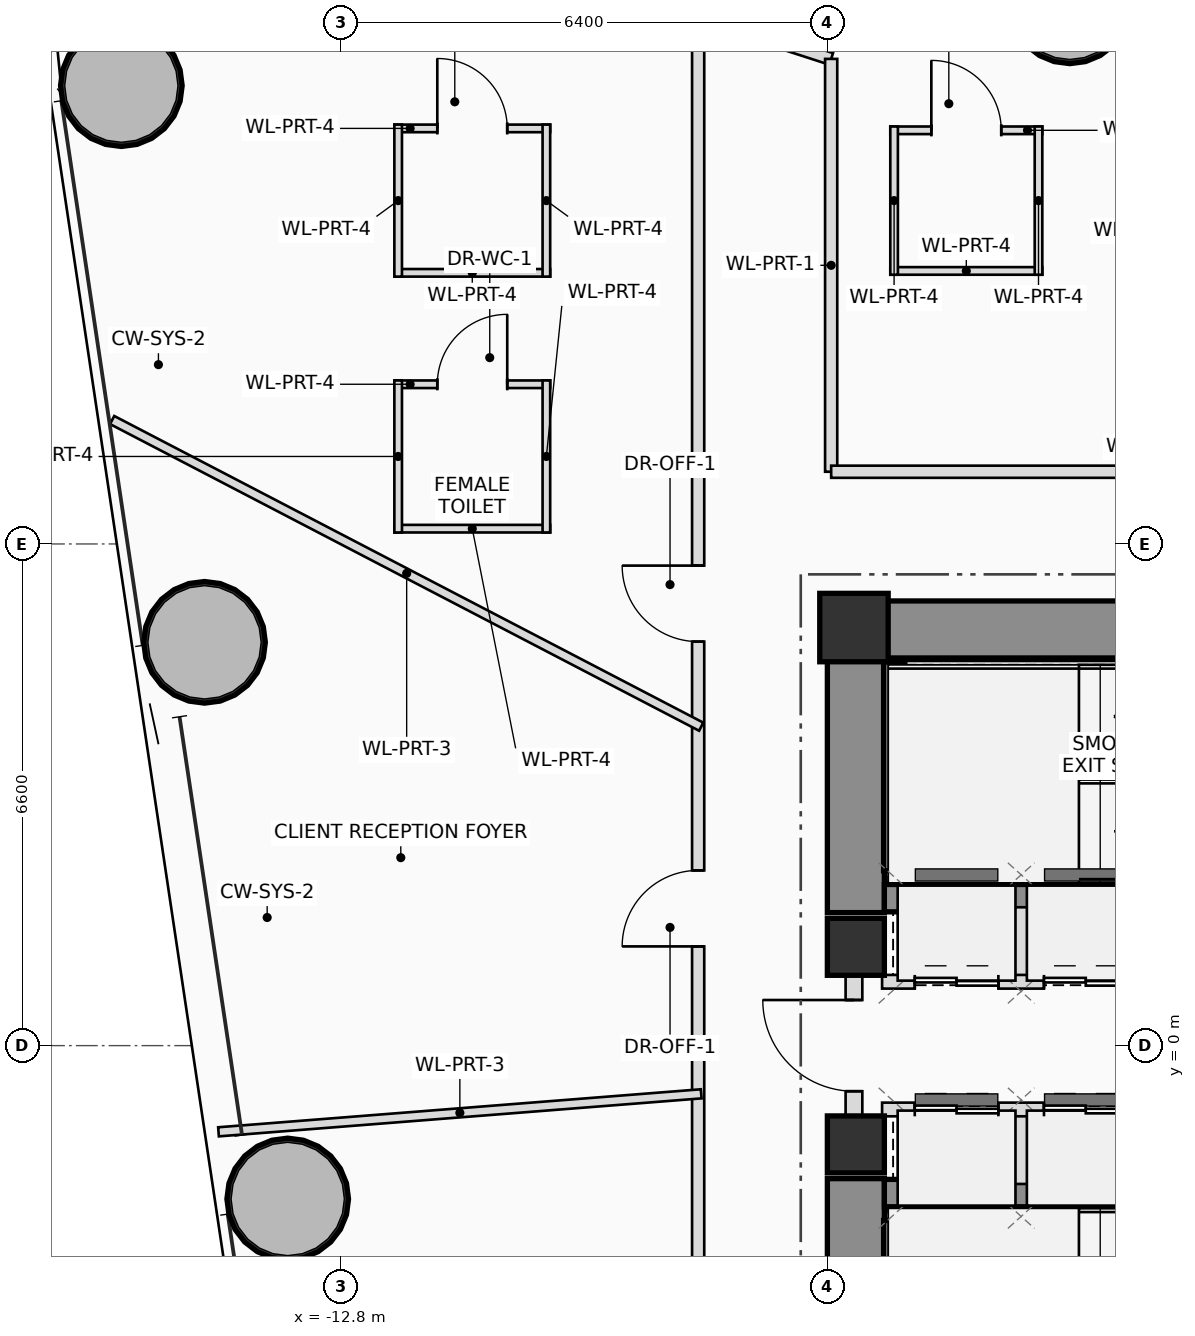
"""IFC4 building model, lengths in metres.
Left out: names, types, materials, properties, quantities, classifications, styles, units other than length and angle.
Written with IfcOpenShell. Run it as: python <this file> out.ifc"""

import sys

from ifc_helpers import new_model, si_unit, direction, frame, frame_2d, origin, origin_2d, place, context, subcontext, project, spatial, rectangle, hollow_circle, extrude, source, transform, mapped, element, fill, save


model = new_model("IFC4")
c1 = context("Model", 3, precision=1e-05, world=origin(), true_north=direction((0.0, 1.0)))
c2 = subcontext(c1, "Body", "Model", "MODEL_VIEW")
j1 = project(units=[si_unit("LENGTHUNIT", "METRE"), si_unit("PLANEANGLEUNIT", "RADIAN")], contexts=[c1])
p1 = place(None, origin())
s1 = spatial("IfcSite", under=j1, at=p1, CompositionType="ELEMENT")
p2 = place(p1, origin())
s2 = spatial("IfcBuilding", under=s1, at=p2, CompositionType="ELEMENT")
p3 = place(p2, frame((0.0, 0.0, 73.55)))
s3 = spatial("IfcBuildingStorey", under=s2, at=p3, CompositionType="ELEMENT", Elevation=73.55)
m1 = source(origin(), c2, "Body", "SweptSolid", [
    extrude(rectangle(XDim=0.9, YDim=0.9, at=origin_2d()), origin(), (0.0, 0.0, 1.0), 3.75),
])
p4 = place(p3, frame((-6.05, 5.5, 0.0), z_axis=(0.0, 0.0, 1.0), x_axis=(1.0, 0.0, 0.0)))
e1 = element("IfcColumn", 1, at=p4, inside=s3, PredefinedType="COLUMN", context=c2, shape_type="MappedRepresentation", body=[
    mapped(m1, transform((0.0, 0.0, 0.0), scale=1.0)),
])
p5 = place(p3, frame((-6.4, 5.475, 0.0), z_axis=(0.0, 0.0, 1.0), x_axis=(1.0, 0.0, 0.0)))
e2 = element("IfcWall", 2, at=p5, inside=s3, PredefinedType="SHEAR", context=c2, shape_type="SweptSolid", body=[
    extrude(rectangle(XDim=12.8, YDim=0.75, at=frame_2d((6.4, 0.0))), origin(), (0.0, 0.0, 1.0), 3.75),
])
p6 = place(p5, frame((8.6, 0.0, 0.0)))
e3 = element("IfcOpeningElement", 3, at=p6, cuts=e2, PredefinedType="OPENING", context=c2, shape_type="SweptSolid", body=[
    extrude(rectangle(XDim=1.2, YDim=2.2, at=frame_2d((0.6, 1.1))), frame((0.0, 0.385, 0.0), z_axis=(0.0, -1.0, 0.0), x_axis=(1.0, 0.0, 0.0)), (0.0, 0.0, 1.0), 0.77),
])
for number, where, z_axis, x_axis in (
    (4, (-6.025, -5.1, 0.0), (0.0, 0.0, 1.0), (0.0, 1.0, 0.0)),
    (5, (-6.025, 1.75, 0.0), (0.0, 0.0, 1.0), (0.0, 1.0, 0.0)),
):
    element("IfcWall", number, at=place(p3, frame(where, z_axis=z_axis, x_axis=x_axis)), inside=s3, PredefinedType="SHEAR", context=c2, shape_type="SweptSolid", body=[
        extrude(rectangle(XDim=3.35, YDim=0.75, at=frame_2d((1.675, 0.0))), origin(), (0.0, 0.0, 1.0), 3.75),
    ])
for number, where, z_axis, x_axis in (
    (6, (-5.65, 1.94, 0.0), (0.0, 0.0, 1.0), (1.0, 0.0, 0.0)),
    (7, (-5.65, -1.94, 0.0), (0.0, 0.0, 1.0), (1.0, 0.0, 0.0)),
):
    element("IfcWall", number, at=place(p3, frame(where, z_axis=z_axis, x_axis=x_axis)), inside=s3, PredefinedType="SHEAR", context=c2, shape_type="SweptSolid", body=[
        extrude(rectangle(XDim=11.3, YDim=0.36, at=frame_2d((5.65, 0.0))), origin(), (0.0, 0.0, 1.0), 3.75),
    ])
for number, where, z_axis, x_axis in (
    (8, (-5.52, 2.3, 0.0), (0.0, 0.0, 1.0), (0.0, 1.0, 0.0)),
    (9, (-5.52, -5.05, 0.0), (0.0, 0.0, 1.0), (0.0, 1.0, 0.0)),
):
    element("IfcWall", number, at=place(p3, frame(where, z_axis=z_axis, x_axis=x_axis)), inside=s3, PredefinedType="SHEAR", context=c2, shape_type="SweptSolid", body=[
        extrude(rectangle(XDim=2.75, YDim=0.28, at=frame_2d((1.375, 0.0))), origin(), (0.0, 0.0, 1.0), 3.75),
    ])
m2 = source(origin(), c2, "Body", "SweptSolid", [
    extrude(rectangle(XDim=0.75, YDim=0.75, at=origin_2d()), origin(), (0.0, 0.0, 1.0), 3.75),
])
for number, where, z_axis, x_axis in (
    (10, (-6.025, -1.3, 0.0), (0.0, 0.0, 1.0), (1.0, 0.0, 0.0)),
    (11, (-6.025, 1.3, 0.0), (0.0, 0.0, 1.0), (1.0, 0.0, 0.0)),
):
    element("IfcColumn", number, at=place(p3, frame(where, z_axis=z_axis, x_axis=x_axis)), inside=s3, PredefinedType="COLUMN", context=c2, shape_type="MappedRepresentation", body=[
        mapped(m2, transform((0.0, 0.0, 0.0), scale=1.0)),
    ])
m3 = source(origin(), c2, "Body", "SweptSolid", [
    extrude(hollow_circle(Radius=0.8, WallThickness=0.055, at=origin_2d()), origin(), (0.0, 0.0, 1.0), 3.75),
])
for number, where, z_axis, x_axis in (
    (12, (-3.21, 13.719, 0.0), (0.0, 0.0, 1.0), (1.0, 0.0, 0.0)),
    (13, (-15.689, 12.629, 0.0), (0.0, 0.0, 1.0), (1.0, 0.0, 0.0)),
    (14, (-14.594, 5.306, 0.0), (0.0, 0.0, 1.0), (1.0, 0.0, 0.0)),
    (15, (-13.5, -2.018, 0.0), (0.0, 0.0, 1.0), (1.0, 0.0, 0.0)),
):
    element("IfcColumn", number, at=place(p3, frame(where, z_axis=z_axis, x_axis=x_axis)), inside=s3, PredefinedType="COLUMN", context=c2, shape_type="MappedRepresentation", body=[
        mapped(m3, transform((0.0, 0.0, 0.0), scale=1.0)),
    ])
p7 = place(p3, frame((-6.05, -0.95, 0.0), z_axis=(0.0, 0.0, 1.0), x_axis=(0.0, 1.0, 0.0)))
e16 = element("IfcWall", 16, at=p7, inside=s3, PredefinedType="PLUMBINGWALL", context=c2, shape_type="SweptSolid", body=[
    extrude(rectangle(XDim=1.9, YDim=0.22, at=frame_2d((0.95, 0.0))), origin(), (0.0, 0.0, 1.0), 2.525),
])
p8 = place(p7, frame((0.35, 0.0, 0.0)))
e17 = element("IfcOpeningElement", 17, at=p8, cuts=e16, PredefinedType="OPENING", context=c2, shape_type="SweptSolid", body=[
    extrude(rectangle(XDim=1.2, YDim=2.2, at=frame_2d((0.6, 1.1))), frame((0.0, 0.12, 0.0), z_axis=(0.0, -1.0, 0.0), x_axis=(1.0, 0.0, 0.0)), (0.0, 0.0, 1.0), 0.24),
])
for number, where, z_axis, x_axis in (
    (18, (-3.85, 0.84, 0.0), (0.0, 0.0, 1.0), (0.0, 1.0, 0.0)),
    (19, (-3.85, -1.82, 0.0), (0.0, 0.0, 1.0), (0.0, 1.0, 0.0)),
):
    element("IfcWall", number, at=place(p3, frame(where, z_axis=z_axis, x_axis=x_axis)), inside=s3, PredefinedType="PLUMBINGWALL", context=c2, shape_type="SweptSolid", body=[
        extrude(rectangle(XDim=0.98, YDim=0.18, at=frame_2d((0.49, 0.0))), origin(), (0.0, 0.0, 1.0), 3.545),
    ])
p9 = place(p3, frame((-5.68, 0.84, 0.0), z_axis=(0.0, 0.0, 1.0), x_axis=(1.0, 0.0, 0.0)))
e20 = element("IfcWall", 20, at=p9, inside=s3, PredefinedType="PLUMBINGWALL", context=c2, shape_type="SweptSolid", body=[
    extrude(rectangle(XDim=11.33, YDim=0.18, at=frame_2d((5.665, 0.0))), origin(), (0.0, 0.0, 1.0), 3.545),
])
p10 = place(p9, frame((0.43, 0.0, 0.0)))
e21 = element("IfcOpeningElement", 21, at=p10, cuts=e20, PredefinedType="OPENING", context=c2, shape_type="SweptSolid", body=[
    extrude(rectangle(XDim=1.1, YDim=2.2, at=frame_2d((0.55, 1.1))), frame((0.0, 0.1, 0.0), z_axis=(0.0, -1.0, 0.0), x_axis=(1.0, 0.0, 0.0)), (0.0, 0.0, 1.0), 0.2),
])
p11 = place(p9, frame((2.13, 0.0, 0.0)))
e22 = element("IfcOpeningElement", 22, at=p11, cuts=e20, PredefinedType="OPENING", context=c2, shape_type="SweptSolid", body=[
    extrude(rectangle(XDim=1.1, YDim=2.2, at=frame_2d((0.55, 1.1))), frame((0.0, 0.1, 0.0), z_axis=(0.0, -1.0, 0.0), x_axis=(1.0, 0.0, 0.0)), (0.0, 0.0, 1.0), 0.2),
])
p12 = place(p3, frame((-5.68, -0.84, 0.0), z_axis=(0.0, 0.0, 1.0), x_axis=(1.0, 0.0, 0.0)))
e23 = element("IfcWall", 23, at=p12, inside=s3, PredefinedType="PLUMBINGWALL", context=c2, shape_type="SweptSolid", body=[
    extrude(rectangle(XDim=10.22, YDim=0.18, at=frame_2d((5.11, 0.0))), origin(), (0.0, 0.0, 1.0), 3.545),
])
p13 = place(p12, frame((0.43, 0.0, 0.0)))
e24 = element("IfcOpeningElement", 24, at=p13, cuts=e23, PredefinedType="OPENING", context=c2, shape_type="SweptSolid", body=[
    extrude(rectangle(XDim=1.1, YDim=2.2, at=frame_2d((0.55, 1.1))), frame((0.0, 0.1, 0.0), z_axis=(0.0, -1.0, 0.0), x_axis=(1.0, 0.0, 0.0)), (0.0, 0.0, 1.0), 0.2),
])
p14 = place(p12, frame((2.13, 0.0, 0.0)))
e25 = element("IfcOpeningElement", 25, at=p14, cuts=e23, PredefinedType="OPENING", context=c2, shape_type="SweptSolid", body=[
    extrude(rectangle(XDim=1.1, YDim=2.2, at=frame_2d((0.55, 1.1))), frame((0.0, 0.1, 0.0), z_axis=(0.0, -1.0, 0.0), x_axis=(1.0, 0.0, 0.0)), (0.0, 0.0, 1.0), 0.2),
])
p15 = place(p12, frame((9.02, 0.0, 0.0)))
e26 = element("IfcOpeningElement", 26, at=p15, cuts=e23, PredefinedType="OPENING", context=c2, shape_type="SweptSolid", body=[
    extrude(rectangle(XDim=0.9, YDim=2.05, at=frame_2d((0.45, 1.025))), frame((0.0, 0.1, 0.0), z_axis=(0.0, -1.0, 0.0), x_axis=(1.0, 0.0, 0.0)), (0.0, 0.0, 1.0), 0.2),
])
p16 = place(p3, frame((-12.097, 12.067, 0.0), z_axis=(0.0, 0.0, 1.0), x_axis=(1.0, 0.0, 0.0)))
e27 = element("IfcWall", 27, at=p16, inside=s3, PredefinedType="PARTITIONING", context=c2, shape_type="SweptSolid", body=[
    extrude(rectangle(XDim=2.05, YDim=0.1, at=frame_2d((1.025, 0.0))), origin(), (0.0, 0.0, 1.0), 3.2),
])
p17 = place(p16, frame((0.565, 0.0, 0.0)))
e28 = element("IfcOpeningElement", 28, at=p17, cuts=e27, PredefinedType="OPENING", context=c2, shape_type="SweptSolid", body=[
    extrude(rectangle(XDim=0.92, YDim=2.1, at=frame_2d((0.46, 1.05))), frame((0.0, 0.06, 0.0), z_axis=(0.0, -1.0, 0.0), x_axis=(1.0, 0.0, 0.0)), (0.0, 0.0, 1.0), 0.12),
])
p18 = place(p3, frame((-10.047, 10.167, 0.0), z_axis=(0.0, 0.0, 1.0), x_axis=(-1.0, 0.0, 0.0)))
e29 = element("IfcWall", 29, at=p18, inside=s3, PredefinedType="PARTITIONING", context=c2, shape_type="SweptSolid", body=[
    extrude(rectangle(XDim=2.05, YDim=0.1, at=frame_2d((1.025, 0.0))), origin(), (0.0, 0.0, 1.0), 3.545),
])
p19 = place(p3, frame((-10.097, 12.117, 0.0), z_axis=(0.0, 0.0, 1.0), x_axis=(0.0, -1.0, 0.0)))
e30 = element("IfcWall", 30, at=p19, inside=s3, PredefinedType="PARTITIONING", context=c2, shape_type="SweptSolid", body=[
    extrude(rectangle(XDim=2.0, YDim=0.1, at=frame_2d((1.0, 0.0))), origin(), (0.0, 0.0, 1.0), 3.545),
])
p20 = place(p3, frame((-12.047, 10.117, 0.0), z_axis=(0.0, 0.0, 1.0), x_axis=(0.0, 1.0, 0.0)))
e31 = element("IfcWall", 31, at=p20, inside=s3, PredefinedType="PARTITIONING", context=c2, shape_type="SweptSolid", body=[
    extrude(rectangle(XDim=2.0, YDim=0.1, at=frame_2d((1.0, 0.0))), origin(), (0.0, 0.0, 1.0), 3.2),
])
p21 = place(p3, frame((-12.097, 8.701, 0.0), z_axis=(0.0, 0.0, 1.0), x_axis=(1.0, 0.0, 0.0)))
e32 = element("IfcWall", 32, at=p21, inside=s3, PredefinedType="PARTITIONING", context=c2, shape_type="SweptSolid", body=[
    extrude(rectangle(XDim=2.05, YDim=0.1, at=frame_2d((1.025, 0.0))), origin(), (0.0, 0.0, 1.0), 2.85),
])
p22 = place(p21, frame((0.565, 0.0, 0.0)))
e33 = element("IfcOpeningElement", 33, at=p22, cuts=e32, PredefinedType="OPENING", context=c2, shape_type="SweptSolid", body=[
    extrude(rectangle(XDim=0.92, YDim=2.1, at=frame_2d((0.46, 1.05))), frame((0.0, 0.06, 0.0), z_axis=(0.0, -1.0, 0.0), x_axis=(1.0, 0.0, 0.0)), (0.0, 0.0, 1.0), 0.12),
])
p23 = place(p3, frame((-10.047, 6.801, 0.0), z_axis=(0.0, 0.0, 1.0), x_axis=(-1.0, 0.0, 0.0)))
e34 = element("IfcWall", 34, at=p23, inside=s3, PredefinedType="PARTITIONING", context=c2, shape_type="SweptSolid", body=[
    extrude(rectangle(XDim=2.05, YDim=0.1, at=frame_2d((1.025, 0.0))), origin(), (0.0, 0.0, 1.0), 3.05),
])
p24 = place(p3, frame((-10.097, 8.751, 0.0), z_axis=(0.0, 0.0, 1.0), x_axis=(0.0, -1.0, 0.0)))
e35 = element("IfcWall", 35, at=p24, inside=s3, PredefinedType="PARTITIONING", context=c2, shape_type="SweptSolid", body=[
    extrude(rectangle(XDim=2.0, YDim=0.1, at=frame_2d((1.0, 0.0))), origin(), (0.0, 0.0, 1.0), 2.85),
])
p25 = place(p3, frame((-12.047, 6.751, 0.0), z_axis=(0.0, 0.0, 1.0), x_axis=(0.0, 1.0, 0.0)))
e36 = element("IfcWall", 36, at=p25, inside=s3, PredefinedType="PARTITIONING", context=c2, shape_type="SweptSolid", body=[
    extrude(rectangle(XDim=2.0, YDim=0.1, at=frame_2d((1.0, 0.0))), origin(), (0.0, 0.0, 1.0), 3.545),
])
p26 = place(p3, frame((-5.572, 12.042, 0.0), z_axis=(0.0, 0.0, 1.0), x_axis=(1.0, 0.0, 0.0)))
e37 = element("IfcWall", 37, at=p26, inside=s3, PredefinedType="PARTITIONING", context=c2, shape_type="SweptSolid", body=[
    extrude(rectangle(XDim=2.0, YDim=0.1, at=frame_2d((1.0, 0.0))), origin(), (0.0, 0.0, 1.0), 2.85),
])
p27 = place(p26, frame((0.54, 0.0, 0.0)))
e38 = element("IfcOpeningElement", 38, at=p27, cuts=e37, PredefinedType="OPENING", context=c2, shape_type="SweptSolid", body=[
    extrude(rectangle(XDim=0.92, YDim=2.1, at=frame_2d((0.46, 1.05))), frame((0.0, 0.06, 0.0), z_axis=(0.0, -1.0, 0.0), x_axis=(1.0, 0.0, 0.0)), (0.0, 0.0, 1.0), 0.12),
])
p28 = place(p3, frame((-3.572, 10.192, 0.0), z_axis=(0.0, 0.0, 1.0), x_axis=(-1.0, 0.0, 0.0)))
e39 = element("IfcWall", 39, at=p28, inside=s3, PredefinedType="PARTITIONING", context=c2, shape_type="SweptSolid", body=[
    extrude(rectangle(XDim=2.0, YDim=0.1, at=frame_2d((1.0, 0.0))), origin(), (0.0, 0.0, 1.0), 2.85),
])
p29 = place(p3, frame((-3.622, 12.092, 0.0), z_axis=(0.0, 0.0, 1.0), x_axis=(0.0, -1.0, 0.0)))
e40 = element("IfcWall", 40, at=p29, inside=s3, PredefinedType="PARTITIONING", context=c2, shape_type="SweptSolid", body=[
    extrude(rectangle(XDim=1.95, YDim=0.1, at=frame_2d((0.975, 0.0))), origin(), (0.0, 0.0, 1.0), 2.85),
])
p30 = place(p3, frame((-5.522, 10.142, 0.0), z_axis=(0.0, 0.0, 1.0), x_axis=(0.0, 1.0, 0.0)))
e41 = element("IfcWall", 41, at=p30, inside=s3, PredefinedType="PARTITIONING", context=c2, shape_type="SweptSolid", body=[
    extrude(rectangle(XDim=1.95, YDim=0.1, at=frame_2d((0.975, 0.0))), origin(), (0.0, 0.0, 1.0), 3.2),
])
p31 = place(p3, frame((-8.1, -7.55, 0.0), z_axis=(0.0, 0.0, 1.0), x_axis=(0.0, 1.0, 0.0)))
e42 = element("IfcWall", 42, at=p31, inside=s3, PredefinedType="PARTITIONING", context=c2, shape_type="SweptSolid", body=[
    extrude(rectangle(XDim=15.1, YDim=0.16, at=frame_2d((7.55, 0.0))), origin(), (0.0, 0.0, 1.0), 2.85),
])
p32 = place(p31, frame((8.855, 0.0, 0.0)))
e43 = element("IfcOpeningElement", 43, at=p32, cuts=e42, PredefinedType="OPENING", context=c2, shape_type="SweptSolid", body=[
    extrude(rectangle(XDim=1.0, YDim=2.25, at=frame_2d((0.5, 1.125))), frame((0.0, 0.09, 0.0), z_axis=(0.0, -1.0, 0.0), x_axis=(1.0, 0.0, 0.0)), (0.0, 0.0, 1.0), 0.18),
])
p33 = place(p31, frame((12.865, 0.0, 0.0)))
e44 = element("IfcOpeningElement", 44, at=p33, cuts=e42, PredefinedType="OPENING", context=c2, shape_type="SweptSolid", body=[
    extrude(rectangle(XDim=1.0, YDim=2.25, at=frame_2d((0.5, 1.125))), frame((0.0, 0.09, 0.0), z_axis=(0.0, -1.0, 0.0), x_axis=(1.0, 0.0, 0.0)), (0.0, 0.0, 1.0), 0.18),
])
p34 = place(p3, frame((-8.1, 7.55, 0.0), z_axis=(0.0, 0.0, 1.0), x_axis=(0.0, 1.0, 0.0)))
e45 = element("IfcWall", 45, at=p34, inside=s3, PredefinedType="PARTITIONING", context=c2, shape_type="SweptSolid", body=[
    extrude(rectangle(XDim=5.85, YDim=0.16, at=frame_2d((2.925, 0.0))), origin(), (0.0, 0.0, 1.0), 2.85),
])
p35 = place(p3, frame((-7.641, 13.4, 0.0), z_axis=(0.0, 0.0, 1.0), x_axis=(0.951277022007, -0.308337521884, 0.0)))
e46 = element("IfcWall", 46, at=p35, inside=s3, PredefinedType="PARTITIONING", context=c2, shape_type="SweptSolid", body=[
    extrude(rectangle(XDim=1.357, YDim=0.16, at=frame_2d((0.679, 0.0))), origin(), (0.0, 0.0, 1.0), 3.545),
])
p36 = place(p3, frame((-6.35, 12.981, 0.0), z_axis=(0.0, 0.0, 1.0), x_axis=(0.0, -1.0, 0.0)))
e47 = element("IfcWall", 47, at=p36, inside=s3, PredefinedType="PARTITIONING", context=c2, shape_type="SweptSolid", body=[
    extrude(rectangle(XDim=5.431, YDim=0.16, at=frame_2d((2.716, 0.0))), origin(), (0.0, 0.0, 1.0), 3.05),
])
p37 = place(p3, frame((-6.35, 7.55, 0.0), z_axis=(0.0, 0.0, 1.0), x_axis=(1.0, 0.0, 0.0)))
e48 = element("IfcWall", 48, at=p37, inside=s3, PredefinedType="PARTITIONING", context=c2, shape_type="SweptSolid", body=[
    extrude(rectangle(XDim=12.7, YDim=0.16, at=frame_2d((6.35, 0.0))), origin(), (0.0, 0.0, 1.0), 2.85),
])
p38 = place(p37, frame((8.564, 0.0, 0.0)))
e49 = element("IfcOpeningElement", 49, at=p38, cuts=e48, PredefinedType="OPENING", context=c2, shape_type="SweptSolid", body=[
    extrude(rectangle(XDim=1.0, YDim=2.25, at=frame_2d((0.5, 1.125))), frame((0.0, 0.09, 0.0), z_axis=(0.0, -1.0, 0.0), x_axis=(1.0, 0.0, 0.0)), (0.0, 0.0, 1.0), 0.18),
])
p39 = place(p3, frame((-8.06, 4.196, 0.0), z_axis=(0.0, 0.0, 1.0), x_axis=(-0.887015422537, 0.461739797052, 0.0)))
e50 = element("IfcWall", 50, at=p39, inside=s3, PredefinedType="PARTITIONING", context=c2, shape_type="SweptSolid", body=[
    extrude(rectangle(XDim=8.738, YDim=0.12, at=frame_2d((4.369, 0.0))), origin(), (0.0, 0.0, 1.0), 2.85),
])
p40 = place(p3, frame((-8.06, -0.634, 0.0), z_axis=(0.0, 0.0, 1.0), x_axis=(-0.996917899667, -0.078451904529, 0.0)))
e51 = element("IfcWall", 51, at=p40, inside=s3, PredefinedType="PARTITIONING", context=c2, shape_type="SweptSolid", body=[
    extrude(rectangle(XDim=6.37, YDim=0.12, at=frame_2d((3.185, 0.0))), origin(), (0.0, 0.0, 1.0), 3.01),
])
p41 = place(p8, origin())
e52 = element("IfcDoor", 52, at=p41, inside=s3, OperationType="SINGLE_SWING_RIGHT", PredefinedType="DOOR", context=c2, shape_type="SweptSolid", body=[
    extrude(rectangle(XDim=1.2, YDim=2.2, at=frame_2d((0.6, 1.1))), frame((0.0, 0.025, 0.0), z_axis=(0.0, -1.0, 0.0), x_axis=(1.0, 0.0, 0.0)), (0.0, 0.0, 1.0), 0.05),
])
fill(e17, e52)
p42 = place(p10, origin())
e53 = element("IfcDoor", 53, at=p42, inside=s3, OperationType="DOUBLE_DOOR_SLIDING", PredefinedType="DOOR", context=c2, shape_type="SweptSolid", body=[
    extrude(rectangle(XDim=1.1, YDim=2.2, at=frame_2d((0.55, 1.1))), frame((0.0, 0.025, 0.0), z_axis=(0.0, -1.0, 0.0), x_axis=(1.0, 0.0, 0.0)), (0.0, 0.0, 1.0), 0.05),
])
fill(e21, e53)
p43 = place(p11, origin())
e54 = element("IfcDoor", 54, at=p43, inside=s3, OperationType="DOUBLE_DOOR_SLIDING", PredefinedType="DOOR", context=c2, shape_type="SweptSolid", body=[
    extrude(rectangle(XDim=1.1, YDim=2.2, at=frame_2d((0.55, 1.1))), frame((0.0, 0.025, 0.0), z_axis=(0.0, -1.0, 0.0), x_axis=(1.0, 0.0, 0.0)), (0.0, 0.0, 1.0), 0.05),
])
fill(e22, e54)
p44 = place(p13, origin())
e55 = element("IfcDoor", 55, at=p44, inside=s3, OperationType="DOUBLE_DOOR_SLIDING", PredefinedType="DOOR", context=c2, shape_type="SweptSolid", body=[
    extrude(rectangle(XDim=1.1, YDim=2.2, at=frame_2d((0.55, 1.1))), frame((0.0, 0.025, 0.0), z_axis=(0.0, -1.0, 0.0), x_axis=(1.0, 0.0, 0.0)), (0.0, 0.0, 1.0), 0.05),
])
fill(e24, e55)
p45 = place(p14, origin())
e56 = element("IfcDoor", 56, at=p45, inside=s3, OperationType="DOUBLE_DOOR_SLIDING", PredefinedType="DOOR", context=c2, shape_type="SweptSolid", body=[
    extrude(rectangle(XDim=1.1, YDim=2.2, at=frame_2d((0.55, 1.1))), frame((0.0, 0.025, 0.0), z_axis=(0.0, -1.0, 0.0), x_axis=(1.0, 0.0, 0.0)), (0.0, 0.0, 1.0), 0.05),
])
fill(e25, e56)
p46 = place(p17, origin())
e57 = element("IfcDoor", 57, at=p46, inside=s3, OperationType="SINGLE_SWING_LEFT", PredefinedType="DOOR", context=c2, shape_type="SweptSolid", body=[
    extrude(rectangle(XDim=0.92, YDim=2.1, at=frame_2d((0.46, 1.05))), frame((0.0, 0.025, 0.0), z_axis=(0.0, -1.0, 0.0), x_axis=(1.0, 0.0, 0.0)), (0.0, 0.0, 1.0), 0.05),
])
fill(e28, e57)
p47 = place(p22, origin())
e58 = element("IfcDoor", 58, at=p47, inside=s3, OperationType="SINGLE_SWING_RIGHT", PredefinedType="DOOR", context=c2, shape_type="SweptSolid", body=[
    extrude(rectangle(XDim=0.92, YDim=2.1, at=frame_2d((0.46, 1.05))), frame((0.0, 0.025, 0.0), z_axis=(0.0, -1.0, 0.0), x_axis=(1.0, 0.0, 0.0)), (0.0, 0.0, 1.0), 0.05),
])
fill(e33, e58)
p48 = place(p27, origin())
e59 = element("IfcDoor", 59, at=p48, inside=s3, OperationType="SINGLE_SWING_LEFT", PredefinedType="DOOR", context=c2, shape_type="SweptSolid", body=[
    extrude(rectangle(XDim=0.92, YDim=2.1, at=frame_2d((0.46, 1.05))), frame((0.0, 0.025, 0.0), z_axis=(0.0, -1.0, 0.0), x_axis=(1.0, 0.0, 0.0)), (0.0, 0.0, 1.0), 0.05),
])
fill(e38, e59)
p49 = place(p32, origin())
e60 = element("IfcDoor", 60, at=p49, inside=s3, OperationType="SINGLE_SWING_LEFT", PredefinedType="DOOR", context=c2, shape_type="SweptSolid", body=[
    extrude(rectangle(XDim=1.0, YDim=2.25, at=frame_2d((0.5, 1.125))), frame((0.0, 0.025, 0.0), z_axis=(0.0, -1.0, 0.0), x_axis=(1.0, 0.0, 0.0)), (0.0, 0.0, 1.0), 0.05),
])
fill(e43, e60)
p50 = place(p33, origin())
e61 = element("IfcDoor", 61, at=p50, inside=s3, OperationType="SINGLE_SWING_RIGHT", PredefinedType="DOOR", context=c2, shape_type="SweptSolid", body=[
    extrude(rectangle(XDim=1.0, YDim=2.25, at=frame_2d((0.5, 1.125))), frame((0.0, 0.025, 0.0), z_axis=(0.0, -1.0, 0.0), x_axis=(1.0, 0.0, 0.0)), (0.0, 0.0, 1.0), 0.05),
])
fill(e44, e61)
save(model, sys.argv[1])
